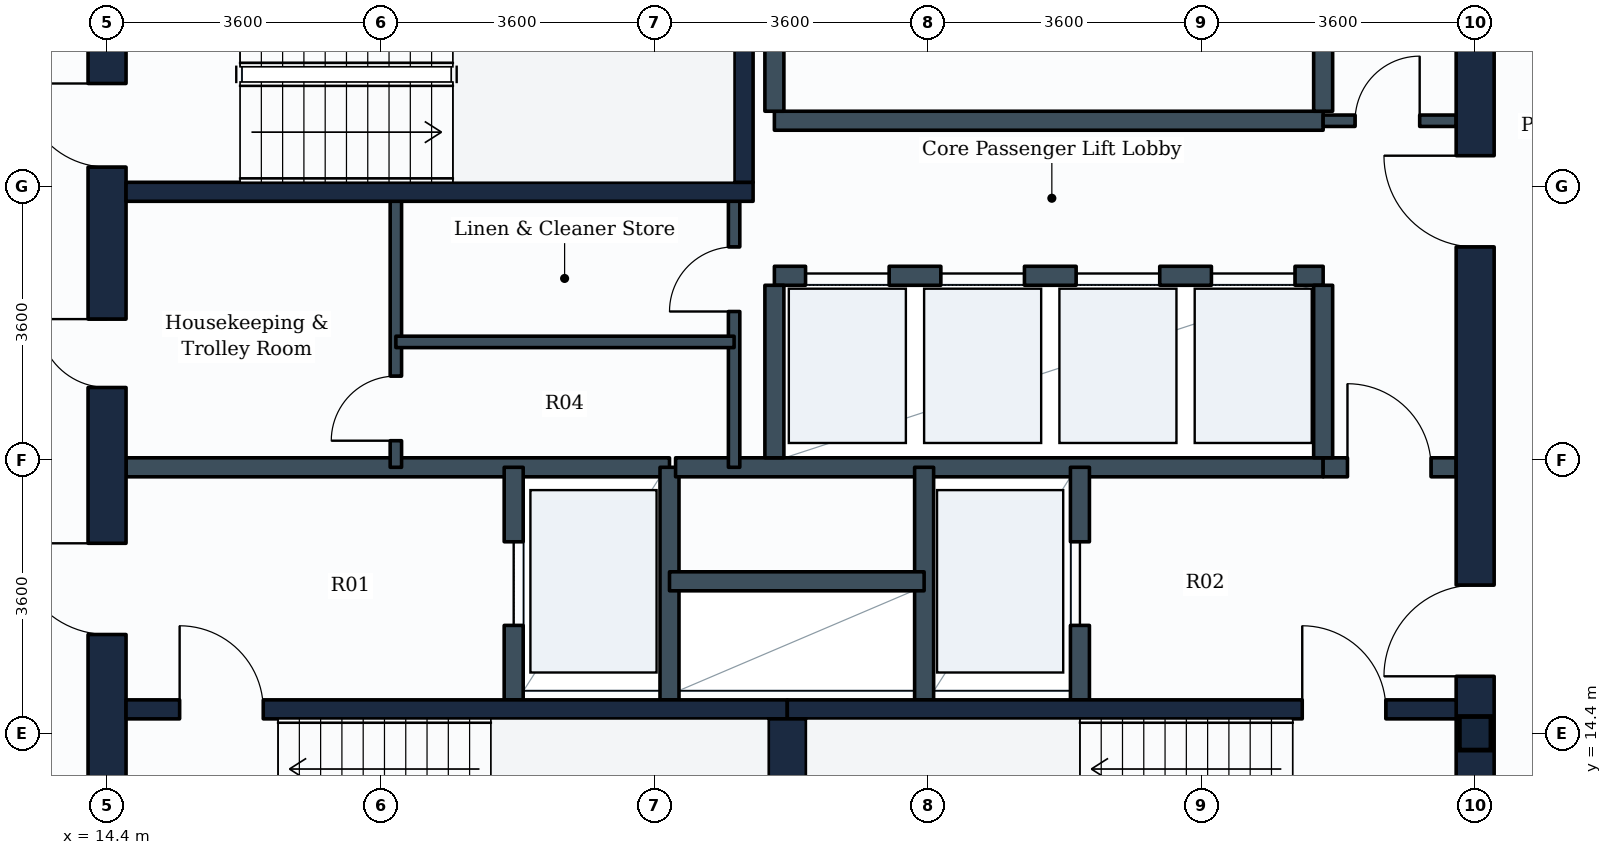
"""IFC4 building model, lengths in metres.
Left out: names, types, materials, properties, quantities, classifications, styles, units other than length and angle.
Written with IfcOpenShell. Run it as: python <this file> out.ifc"""

import sys

from ifc_helpers import new_model, si_unit, direction, frame, frame_2d, origin, origin_2d, place, context, subcontext, project, spatial, rectangle, i_section, extrude, element, fill, save


model = new_model("IFC4")
c1 = context("Model", 3, precision=1e-05, world=origin(), true_north=direction((0.0, 1.0)))
c2 = subcontext(c1, "Body", "Model", "MODEL_VIEW")
j1 = project(units=[si_unit("LENGTHUNIT", "METRE"), si_unit("PLANEANGLEUNIT", "RADIAN")], contexts=[c1])
p1 = place(None, origin())
s1 = spatial("IfcSite", under=j1, at=p1, CompositionType="ELEMENT")
p2 = place(p1, origin())
s2 = spatial("IfcBuilding", under=s1, at=p2, CompositionType="ELEMENT")
p3 = place(p2, frame((0.0, 0.0, 193.8)))
s3 = spatial("IfcBuildingStorey", under=s2, at=p3, CompositionType="ELEMENT", Elevation=193.8)
p4 = place(p3, frame((32.4, 14.4, 0.0), z_axis=(0.0, 0.0, 1.0), x_axis=(1.0, 0.0, 0.0)))
e1 = element("IfcColumn", 1, at=p4, inside=s3, PredefinedType="COLUMN", context=c2, shape_type="SweptSolid", body=[
    extrude(i_section(OverallWidth=0.416, OverallDepth=0.442, WebThickness=0.025, FlangeThickness=0.041, FilletRadius=0.015, at=origin_2d()), origin(), (0.0, 0.0, 1.0), 3.8),
])
p5 = place(p3, frame((14.4, 10.8, 0.0), z_axis=(0.0, 0.0, 1.0), x_axis=(0.0, 1.0, 0.0)))
e2 = element("IfcWall", 2, at=p5, inside=s3, PredefinedType="SHEAR", context=c2, shape_type="SweptSolid", body=[
    extrude(rectangle(XDim=14.4, YDim=0.5, at=frame_2d((7.2, 0.0))), origin(), (0.0, 0.0, 1.0), 3.55),
])
p6 = place(p5, frame((11.05, 0.0, 0.0)))
e3 = element("IfcOpeningElement", 3, at=p6, cuts=e2, PredefinedType="OPENING", context=c2, shape_type="SweptSolid", body=[
    extrude(rectangle(XDim=1.1, YDim=2.1, at=frame_2d((0.55, 1.05))), frame((0.0, 0.26, 0.0), z_axis=(0.0, -1.0, 0.0), x_axis=(1.0, 0.0, 0.0)), (0.0, 0.0, 1.0), 0.52),
])
p7 = place(p5, frame((4.9, 0.0, 0.0)))
e4 = element("IfcOpeningElement", 4, at=p7, cuts=e2, PredefinedType="OPENING", context=c2, shape_type="SweptSolid", body=[
    extrude(rectangle(XDim=1.2, YDim=2.1, at=frame_2d((0.6, 1.05))), frame((0.0, 0.26, 0.0), z_axis=(0.0, -1.0, 0.0), x_axis=(1.0, 0.0, 0.0)), (0.0, 0.0, 1.0), 0.52),
])
p8 = place(p5, frame((8.15, 0.0, 0.0)))
e5 = element("IfcOpeningElement", 5, at=p8, cuts=e2, PredefinedType="OPENING", context=c2, shape_type="SweptSolid", body=[
    extrude(rectangle(XDim=0.9, YDim=2.1, at=frame_2d((0.45, 1.05))), frame((0.0, 0.26, 0.0), z_axis=(0.0, -1.0, 0.0), x_axis=(1.0, 0.0, 0.0)), (0.0, 0.0, 1.0), 0.52),
])
p9 = place(p3, frame((32.4, 10.8, 0.0), z_axis=(0.0, 0.0, 1.0), x_axis=(0.0, 1.0, 0.0)))
e6 = element("IfcWall", 6, at=p9, inside=s3, PredefinedType="SHEAR", context=c2, shape_type="SweptSolid", body=[
    extrude(rectangle(XDim=14.4, YDim=0.5, at=frame_2d((7.2, 0.0))), origin(), (0.0, 0.0, 1.0), 3.55),
])
p10 = place(p9, frame((4.35, 0.0, 0.0)))
e7 = element("IfcOpeningElement", 7, at=p10, cuts=e6, PredefinedType="OPENING", context=c2, shape_type="SweptSolid", body=[
    extrude(rectangle(XDim=1.2, YDim=2.1, at=frame_2d((0.6, 1.05))), frame((0.0, 0.26, 0.0), z_axis=(0.0, -1.0, 0.0), x_axis=(1.0, 0.0, 0.0)), (0.0, 0.0, 1.0), 0.52),
])
p11 = place(p9, frame((10.0, 0.0, 0.0)))
e8 = element("IfcOpeningElement", 8, at=p11, cuts=e6, PredefinedType="OPENING", context=c2, shape_type="SweptSolid", body=[
    extrude(rectangle(XDim=1.2, YDim=2.1, at=frame_2d((0.6, 1.05))), frame((0.0, 0.26, 0.0), z_axis=(0.0, -1.0, 0.0), x_axis=(1.0, 0.0, 0.0)), (0.0, 0.0, 1.0), 0.52),
])
p12 = place(p3, frame((14.65, 14.715, 0.0), z_axis=(0.0, 0.0, 1.0), x_axis=(1.0, 0.0, 0.0)))
e9 = element("IfcWall", 9, at=p12, inside=s3, PredefinedType="SHEAR", context=c2, shape_type="SweptSolid", body=[
    extrude(rectangle(XDim=8.7, YDim=0.25, at=frame_2d((4.35, 0.0))), origin(), (0.0, 0.0, 1.0), 3.55),
])
p13 = place(p12, frame((0.705, 0.0, 0.0)))
e10 = element("IfcOpeningElement", 10, at=p13, cuts=e9, PredefinedType="OPENING", context=c2, shape_type="SweptSolid", body=[
    extrude(rectangle(XDim=1.1, YDim=2.1, at=frame_2d((0.55, 1.05))), frame((0.0, 0.135, 0.0), z_axis=(0.0, -1.0, 0.0), x_axis=(1.0, 0.0, 0.0)), (0.0, 0.0, 1.0), 0.27),
])
p14 = place(p3, frame((23.35, 14.715, 0.0), z_axis=(0.0, 0.0, 1.0), x_axis=(1.0, 0.0, 0.0)))
e11 = element("IfcWall", 11, at=p14, inside=s3, PredefinedType="SHEAR", context=c2, shape_type="SweptSolid", body=[
    extrude(rectangle(XDim=8.8, YDim=0.25, at=frame_2d((4.4, 0.0))), origin(), (0.0, 0.0, 1.0), 3.55),
])
p15 = place(p14, frame((6.775, 0.0, 0.0)))
e12 = element("IfcOpeningElement", 12, at=p15, cuts=e11, PredefinedType="OPENING", context=c2, shape_type="SweptSolid", body=[
    extrude(rectangle(XDim=1.1, YDim=2.1, at=frame_2d((0.55, 1.05))), frame((0.0, 0.135, 0.0), z_axis=(0.0, -1.0, 0.0), x_axis=(1.0, 0.0, 0.0)), (0.0, 0.0, 1.0), 0.27),
])
p16 = place(p3, frame((23.35, 11.75, 0.0), z_axis=(0.0, 0.0, 1.0), x_axis=(0.0, 1.0, 0.0)))
e13 = element("IfcWall", 13, at=p16, inside=s3, PredefinedType="SHEAR", context=c2, shape_type="SweptSolid", body=[
    extrude(rectangle(XDim=2.84, YDim=0.5, at=frame_2d((1.42, 0.0))), origin(), (0.0, 0.0, 1.0), 3.55),
])
p17 = place(p3, frame((14.65, 21.525, 0.0), z_axis=(0.0, 0.0, 1.0), x_axis=(1.0, 0.0, 0.0)))
e14 = element("IfcWall", 14, at=p17, inside=s3, PredefinedType="SHEAR", context=c2, shape_type="SweptSolid", body=[
    extrude(rectangle(XDim=8.25, YDim=0.25, at=frame_2d((4.125, 0.0))), origin(), (0.0, 0.0, 1.0), 3.55),
])
p18 = place(p3, frame((22.775, 21.65, 0.0), z_axis=(0.0, 0.0, 1.0), x_axis=(0.0, 1.0, 0.0)))
e15 = element("IfcWall", 15, at=p18, inside=s3, PredefinedType="SHEAR", context=c2, shape_type="SweptSolid", body=[
    extrude(rectangle(XDim=2.84, YDim=0.25, at=frame_2d((1.42, 0.0))), origin(), (0.0, 0.0, 1.0), 3.55),
])
p19 = place(p3, frame((14.65, 17.9, 0.0), z_axis=(0.0, 0.0, 1.0), x_axis=(1.0, 0.0, 0.0)))
e16 = element("IfcWall", 16, at=p19, inside=s3, PredefinedType="PARTITIONING", context=c2, shape_type="SweptSolid", body=[
    extrude(rectangle(XDim=7.15, YDim=0.25, at=frame_2d((3.575, 0.0))), origin(), (0.0, 0.0, 1.0), 3.535),
])
p20 = place(p3, frame((19.75, 14.84, 0.0), z_axis=(0.0, 0.0, 1.0), x_axis=(0.0, 1.0, 0.0)))
e17 = element("IfcWall", 17, at=p20, inside=s3, PredefinedType="PARTITIONING", context=c2, shape_type="SweptSolid", body=[
    extrude(rectangle(XDim=3.06, YDim=0.25, at=frame_2d((1.53, 0.0))), origin(), (0.0, 0.0, 1.0), 3.535),
])
p21 = place(p20, frame((0.98, 0.0, 0.0)))
e18 = element("IfcOpeningElement", 18, at=p21, cuts=e17, PredefinedType="OPENING", context=c2, shape_type="SweptSolid", body=[
    extrude(rectangle(XDim=1.1, YDim=2.1, at=frame_2d((0.55, 1.05))), frame((0.0, 0.135, 0.0), z_axis=(0.0, -1.0, 0.0), x_axis=(1.0, 0.0, 0.0)), (0.0, 0.0, 1.0), 0.27),
])
p22 = place(p3, frame((21.8, 14.84, 0.0), z_axis=(0.0, 0.0, 1.0), x_axis=(0.0, 1.0, 0.0)))
e19 = element("IfcWall", 19, at=p22, inside=s3, PredefinedType="PARTITIONING", context=c2, shape_type="SweptSolid", body=[
    extrude(rectangle(XDim=3.06, YDim=0.25, at=frame_2d((1.53, 0.0))), origin(), (0.0, 0.0, 1.0), 3.535),
])
p23 = place(p3, frame((21.88, 17.9, 0.0), z_axis=(0.0, 0.0, 1.0), x_axis=(1.0, 0.0, 0.0)))
e20 = element("IfcWall", 20, at=p23, inside=s3, PredefinedType="PARTITIONING", context=c2, shape_type="SweptSolid", body=[
    extrude(rectangle(XDim=8.52, YDim=0.25, at=frame_2d((4.26, 0.0))), origin(), (0.0, 0.0, 1.0), 3.535),
])
p24 = place(p3, frame((30.4, 17.9, 0.0), z_axis=(0.0, 0.0, 1.0), x_axis=(1.0, 0.0, 0.0)))
e21 = element("IfcWall", 21, at=p24, inside=s3, PredefinedType="PARTITIONING", context=c2, shape_type="SweptSolid", body=[
    extrude(rectangle(XDim=1.75, YDim=0.25, at=frame_2d((0.875, 0.0))), origin(), (0.0, 0.0, 1.0), 3.535),
])
p25 = place(p24, frame((0.32, 0.0, 0.0)))
e22 = element("IfcOpeningElement", 22, at=p25, cuts=e21, PredefinedType="OPENING", context=c2, shape_type="SweptSolid", body=[
    extrude(rectangle(XDim=1.1, YDim=2.1, at=frame_2d((0.55, 1.05))), frame((0.0, 0.135, 0.0), z_axis=(0.0, -1.0, 0.0), x_axis=(1.0, 0.0, 0.0)), (0.0, 0.0, 1.0), 0.27),
])
p26 = place(p3, frame((25.15, 14.84, 0.0), z_axis=(0.0, 0.0, 1.0), x_axis=(0.0, 1.0, 0.0)))
e23 = element("IfcWall", 23, at=p26, inside=s3, PredefinedType="PARTITIONING", context=c2, shape_type="SweptSolid", body=[
    extrude(rectangle(XDim=3.06, YDim=0.25, at=frame_2d((1.53, 0.0))), origin(), (0.0, 0.0, 1.0), 3.535),
])
p27 = place(p3, frame((27.2, 14.84, 0.0), z_axis=(0.0, 0.0, 1.0), x_axis=(0.0, 1.0, 0.0)))
e24 = element("IfcWall", 24, at=p27, inside=s3, PredefinedType="PARTITIONING", context=c2, shape_type="SweptSolid", body=[
    extrude(rectangle(XDim=3.06, YDim=0.25, at=frame_2d((1.53, 0.0))), origin(), (0.0, 0.0, 1.0), 3.535),
])
p28 = place(p27, frame((0.98, 0.0, 0.0)))
e25 = element("IfcOpeningElement", 25, at=p28, cuts=e24, PredefinedType="OPENING", context=c2, shape_type="SweptSolid", body=[
    extrude(rectangle(XDim=1.1, YDim=2.1, at=frame_2d((0.55, 1.05))), frame((0.0, 0.135, 0.0), z_axis=(0.0, -1.0, 0.0), x_axis=(1.0, 0.0, 0.0)), (0.0, 0.0, 1.0), 0.27),
])
p29 = place(p3, frame((21.8, 16.4, 0.0), z_axis=(0.0, 0.0, 1.0), x_axis=(1.0, 0.0, 0.0)))
e26 = element("IfcWall", 26, at=p29, inside=s3, PredefinedType="PARTITIONING", context=c2, shape_type="SweptSolid", body=[
    extrude(rectangle(XDim=3.35, YDim=0.25, at=frame_2d((1.675, 0.0))), origin(), (0.0, 0.0, 1.0), 3.535),
])
p30 = place(p3, frame((23.18, 20.42, 0.0), z_axis=(0.0, 0.0, 1.0), x_axis=(1.0, 0.0, 0.0)))
e27 = element("IfcWall", 27, at=p30, inside=s3, PredefinedType="PARTITIONING", context=c2, shape_type="SweptSolid", body=[
    extrude(rectangle(XDim=7.22, YDim=0.25, at=frame_2d((3.61, 0.0))), origin(), (0.0, 0.0, 1.0), 3.535),
])
p31 = place(p30, frame((0.41, 0.0, 0.0)))
e28 = element("IfcOpeningElement", 28, at=p31, cuts=e27, PredefinedType="OPENING", context=c2, shape_type="SweptSolid", body=[
    extrude(rectangle(XDim=1.1, YDim=2.1, at=frame_2d((0.55, 1.05))), frame((0.0, 0.135, 0.0), z_axis=(0.0, -1.0, 0.0), x_axis=(1.0, 0.0, 0.0)), (0.0, 0.0, 1.0), 0.27),
])
p32 = place(p30, frame((2.19, 0.0, 0.0)))
e29 = element("IfcOpeningElement", 29, at=p32, cuts=e27, PredefinedType="OPENING", context=c2, shape_type="SweptSolid", body=[
    extrude(rectangle(XDim=1.1, YDim=2.1, at=frame_2d((0.55, 1.05))), frame((0.0, 0.135, 0.0), z_axis=(0.0, -1.0, 0.0), x_axis=(1.0, 0.0, 0.0)), (0.0, 0.0, 1.0), 0.27),
])
p33 = place(p30, frame((3.97, 0.0, 0.0)))
e30 = element("IfcOpeningElement", 30, at=p33, cuts=e27, PredefinedType="OPENING", context=c2, shape_type="SweptSolid", body=[
    extrude(rectangle(XDim=1.1, YDim=2.1, at=frame_2d((0.55, 1.05))), frame((0.0, 0.135, 0.0), z_axis=(0.0, -1.0, 0.0), x_axis=(1.0, 0.0, 0.0)), (0.0, 0.0, 1.0), 0.27),
])
p34 = place(p30, frame((5.75, 0.0, 0.0)))
e31 = element("IfcOpeningElement", 31, at=p34, cuts=e27, PredefinedType="OPENING", context=c2, shape_type="SweptSolid", body=[
    extrude(rectangle(XDim=1.1, YDim=2.1, at=frame_2d((0.55, 1.05))), frame((0.0, 0.135, 0.0), z_axis=(0.0, -1.0, 0.0), x_axis=(1.0, 0.0, 0.0)), (0.0, 0.0, 1.0), 0.27),
])
for number, where, z_axis, x_axis in (
    (32, (23.18, 18.025, 0.0), (0.0, 0.0, 1.0), (0.0, 1.0, 0.0)),
    (33, (30.4, 18.025, 0.0), (0.0, 0.0, 1.0), (0.0, 1.0, 0.0)),
):
    element("IfcWall", number, at=place(p3, frame(where, z_axis=z_axis, x_axis=x_axis)), inside=s3, PredefinedType="PARTITIONING", context=c2, shape_type="SweptSolid", body=[
        extrude(rectangle(XDim=2.27, YDim=0.25, at=frame_2d((1.135, 0.0))), origin(), (0.0, 0.0, 1.0), 3.535),
    ])
p35 = place(p3, frame((23.18, 22.46, 0.0), z_axis=(0.0, 0.0, 1.0), x_axis=(1.0, 0.0, 0.0)))
e34 = element("IfcWall", 34, at=p35, inside=s3, PredefinedType="PARTITIONING", context=c2, shape_type="SweptSolid", body=[
    extrude(rectangle(XDim=7.22, YDim=0.25, at=frame_2d((3.61, 0.0))), origin(), (0.0, 0.0, 1.0), 3.535),
])
for number, where, z_axis, x_axis in (
    (35, (23.18, 22.585, 0.0), (0.0, 0.0, 1.0), (0.0, 1.0, 0.0)),
    (36, (30.4, 22.585, 0.0), (0.0, 0.0, 1.0), (0.0, 1.0, 0.0)),
):
    element("IfcWall", number, at=place(p3, frame(where, z_axis=z_axis, x_axis=x_axis)), inside=s3, PredefinedType="PARTITIONING", context=c2, shape_type="SweptSolid", body=[
        extrude(rectangle(XDim=2.315, YDim=0.25, at=frame_2d((1.157, 0.0))), origin(), (0.0, 0.0, 1.0), 3.535),
    ])
p36 = place(p3, frame((22.65, 17.9, 0.0), z_axis=(0.0, 0.0, 1.0), x_axis=(0.0, 1.0, 0.0)))
e37 = element("IfcWall", 37, at=p36, inside=s3, PredefinedType="PARTITIONING", context=c2, shape_type="SweptSolid", body=[
    extrude(rectangle(XDim=3.625, YDim=0.15, at=frame_2d((1.812, 0.0))), origin(), (0.0, 0.0, 1.0), 3.535),
])
p37 = place(p36, frame((2.05, 0.0, 0.0)))
e38 = element("IfcOpeningElement", 38, at=p37, cuts=e37, PredefinedType="OPENING", context=c2, shape_type="SweptSolid", body=[
    extrude(rectangle(XDim=0.85, YDim=2.1, at=frame_2d((0.425, 1.05))), frame((0.0, 0.085, 0.0), z_axis=(0.0, -1.0, 0.0), x_axis=(1.0, 0.0, 0.0)), (0.0, 0.0, 1.0), 0.17),
])
p38 = place(p3, frame((18.2, 17.9, 0.0), z_axis=(0.0, 0.0, 1.0), x_axis=(0.0, 1.0, 0.0)))
e39 = element("IfcWall", 39, at=p38, inside=s3, PredefinedType="PARTITIONING", context=c2, shape_type="SweptSolid", body=[
    extrude(rectangle(XDim=3.625, YDim=0.15, at=frame_2d((1.812, 0.0))), origin(), (0.0, 0.0, 1.0), 3.535),
])
p39 = place(p38, frame((0.35, 0.0, 0.0)))
e40 = element("IfcOpeningElement", 40, at=p39, cuts=e39, PredefinedType="OPENING", context=c2, shape_type="SweptSolid", body=[
    extrude(rectangle(XDim=0.85, YDim=2.1, at=frame_2d((0.425, 1.05))), frame((0.0, 0.085, 0.0), z_axis=(0.0, -1.0, 0.0), x_axis=(1.0, 0.0, 0.0)), (0.0, 0.0, 1.0), 0.17),
])
p40 = place(p3, frame((18.2, 19.55, 0.0), z_axis=(0.0, 0.0, 1.0), x_axis=(1.0, 0.0, 0.0)))
e41 = element("IfcWall", 41, at=p40, inside=s3, PredefinedType="PARTITIONING", context=c2, shape_type="SweptSolid", body=[
    extrude(rectangle(XDim=4.45, YDim=0.15, at=frame_2d((2.225, 0.0))), origin(), (0.0, 0.0, 1.0), 3.535),
])
p41 = place(p3, frame((30.4, 22.46, 0.0), z_axis=(0.0, 0.0, 1.0), x_axis=(1.0, 0.0, 0.0)))
e42 = element("IfcWall", 42, at=p41, inside=s3, PredefinedType="PARTITIONING", context=c2, shape_type="SweptSolid", body=[
    extrude(rectangle(XDim=1.75, YDim=0.15, at=frame_2d((0.875, 0.0))), origin(), (0.0, 0.0, 1.0), 3.535),
])
p42 = place(p41, frame((0.42, 0.0, 0.0)))
e43 = element("IfcOpeningElement", 43, at=p42, cuts=e42, PredefinedType="OPENING", context=c2, shape_type="SweptSolid", body=[
    extrude(rectangle(XDim=0.85, YDim=2.1, at=frame_2d((0.425, 1.05))), frame((0.0, 0.085, 0.0), z_axis=(0.0, -1.0, 0.0), x_axis=(1.0, 0.0, 0.0)), (0.0, 0.0, 1.0), 0.17),
])
p43 = place(p13, origin())
e44 = element("IfcDoor", 44, at=p43, inside=s3, OperationType="SINGLE_SWING_LEFT", PredefinedType="DOOR", context=c2, shape_type="SweptSolid", body=[
    extrude(rectangle(XDim=1.1, YDim=2.1, at=frame_2d((0.55, 1.05))), frame((0.0, 0.025, 0.0), z_axis=(0.0, -1.0, 0.0), x_axis=(1.0, 0.0, 0.0)), (0.0, 0.0, 1.0), 0.05),
])
fill(e10, e44)
p44 = place(p15, origin())
e45 = element("IfcDoor", 45, at=p44, inside=s3, OperationType="SINGLE_SWING_LEFT", PredefinedType="DOOR", context=c2, shape_type="SweptSolid", body=[
    extrude(rectangle(XDim=1.1, YDim=2.1, at=frame_2d((0.55, 1.05))), frame((0.0, 0.025, 0.0), z_axis=(0.0, -1.0, 0.0), x_axis=(1.0, 0.0, 0.0)), (0.0, 0.0, 1.0), 0.05),
])
fill(e12, e45)
p45 = place(p6, origin())
e46 = element("IfcDoor", 46, at=p45, inside=s3, OperationType="SINGLE_SWING_RIGHT", PredefinedType="DOOR", context=c2, shape_type="SweptSolid", body=[
    extrude(rectangle(XDim=1.1, YDim=2.1, at=frame_2d((0.55, 1.05))), frame((0.0, 0.025, 0.0), z_axis=(0.0, -1.0, 0.0), x_axis=(1.0, 0.0, 0.0)), (0.0, 0.0, 1.0), 0.05),
])
fill(e3, e46)
p46 = place(p21, origin())
e47 = element("IfcDoor", 47, at=p46, inside=s3, OperationType="SLIDING_TO_LEFT", PredefinedType="DOOR", context=c2, shape_type="SweptSolid", body=[
    extrude(rectangle(XDim=1.1, YDim=2.1, at=frame_2d((0.55, 1.05))), frame((0.0, 0.025, 0.0), z_axis=(0.0, -1.0, 0.0), x_axis=(1.0, 0.0, 0.0)), (0.0, 0.0, 1.0), 0.05),
])
fill(e18, e47)
p47 = place(p28, origin())
e48 = element("IfcDoor", 48, at=p47, inside=s3, OperationType="SLIDING_TO_LEFT", PredefinedType="DOOR", context=c2, shape_type="SweptSolid", body=[
    extrude(rectangle(XDim=1.1, YDim=2.1, at=frame_2d((0.55, 1.05))), frame((0.0, 0.025, 0.0), z_axis=(0.0, -1.0, 0.0), x_axis=(1.0, 0.0, 0.0)), (0.0, 0.0, 1.0), 0.05),
])
fill(e25, e48)
p48 = place(p7, origin())
e49 = element("IfcDoor", 49, at=p48, inside=s3, OperationType="SINGLE_SWING_RIGHT", PredefinedType="DOOR", context=c2, shape_type="SweptSolid", body=[
    extrude(rectangle(XDim=1.2, YDim=2.1, at=frame_2d((0.6, 1.05))), frame((0.0, 0.025, 0.0), z_axis=(0.0, -1.0, 0.0), x_axis=(1.0, 0.0, 0.0)), (0.0, 0.0, 1.0), 0.05),
])
fill(e4, e49)
p49 = place(p10, origin())
e50 = element("IfcDoor", 50, at=p49, inside=s3, OperationType="SINGLE_SWING_LEFT", PredefinedType="DOOR", context=c2, shape_type="SweptSolid", body=[
    extrude(rectangle(XDim=1.2, YDim=2.1, at=frame_2d((0.6, 1.05))), frame((0.0, 0.025, 0.0), z_axis=(0.0, -1.0, 0.0), x_axis=(1.0, 0.0, 0.0)), (0.0, 0.0, 1.0), 0.05),
])
fill(e7, e50)
p50 = place(p25, origin())
e51 = element("IfcDoor", 51, at=p50, inside=s3, OperationType="SINGLE_SWING_LEFT", PredefinedType="DOOR", context=c2, shape_type="SweptSolid", body=[
    extrude(rectangle(XDim=1.1, YDim=2.1, at=frame_2d((0.55, 1.05))), frame((0.0, 0.025, 0.0), z_axis=(0.0, -1.0, 0.0), x_axis=(1.0, 0.0, 0.0)), (0.0, 0.0, 1.0), 0.05),
])
fill(e22, e51)
p51 = place(p31, origin())
e52 = element("IfcDoor", 52, at=p51, inside=s3, OperationType="SLIDING_TO_LEFT", PredefinedType="DOOR", context=c2, shape_type="SweptSolid", body=[
    extrude(rectangle(XDim=1.1, YDim=2.1, at=frame_2d((0.55, 1.05))), frame((0.0, 0.025, 0.0), z_axis=(0.0, -1.0, 0.0), x_axis=(1.0, 0.0, 0.0)), (0.0, 0.0, 1.0), 0.05),
])
fill(e28, e52)
p52 = place(p32, origin())
e53 = element("IfcDoor", 53, at=p52, inside=s3, OperationType="SLIDING_TO_LEFT", PredefinedType="DOOR", context=c2, shape_type="SweptSolid", body=[
    extrude(rectangle(XDim=1.1, YDim=2.1, at=frame_2d((0.55, 1.05))), frame((0.0, 0.025, 0.0), z_axis=(0.0, -1.0, 0.0), x_axis=(1.0, 0.0, 0.0)), (0.0, 0.0, 1.0), 0.05),
])
fill(e29, e53)
p53 = place(p33, origin())
e54 = element("IfcDoor", 54, at=p53, inside=s3, OperationType="SLIDING_TO_LEFT", PredefinedType="DOOR", context=c2, shape_type="SweptSolid", body=[
    extrude(rectangle(XDim=1.1, YDim=2.1, at=frame_2d((0.55, 1.05))), frame((0.0, 0.025, 0.0), z_axis=(0.0, -1.0, 0.0), x_axis=(1.0, 0.0, 0.0)), (0.0, 0.0, 1.0), 0.05),
])
fill(e30, e54)
p54 = place(p34, origin())
e55 = element("IfcDoor", 55, at=p54, inside=s3, OperationType="SLIDING_TO_LEFT", PredefinedType="DOOR", context=c2, shape_type="SweptSolid", body=[
    extrude(rectangle(XDim=1.1, YDim=2.1, at=frame_2d((0.55, 1.05))), frame((0.0, 0.025, 0.0), z_axis=(0.0, -1.0, 0.0), x_axis=(1.0, 0.0, 0.0)), (0.0, 0.0, 1.0), 0.05),
])
fill(e31, e55)
p55 = place(p11, origin())
e56 = element("IfcDoor", 56, at=p55, inside=s3, OperationType="SINGLE_SWING_RIGHT", PredefinedType="DOOR", context=c2, shape_type="SweptSolid", body=[
    extrude(rectangle(XDim=1.2, YDim=2.1, at=frame_2d((0.6, 1.05))), frame((0.0, 0.025, 0.0), z_axis=(0.0, -1.0, 0.0), x_axis=(1.0, 0.0, 0.0)), (0.0, 0.0, 1.0), 0.05),
])
fill(e8, e56)
p56 = place(p8, origin())
e57 = element("IfcDoor", 57, at=p56, inside=s3, OperationType="SINGLE_SWING_RIGHT", PredefinedType="DOOR", context=c2, shape_type="SweptSolid", body=[
    extrude(rectangle(XDim=0.9, YDim=2.1, at=frame_2d((0.45, 1.05))), frame((0.0, 0.025, 0.0), z_axis=(0.0, -1.0, 0.0), x_axis=(1.0, 0.0, 0.0)), (0.0, 0.0, 1.0), 0.05),
])
fill(e5, e57)
p57 = place(p39, origin())
e58 = element("IfcDoor", 58, at=p57, inside=s3, OperationType="SINGLE_SWING_LEFT", PredefinedType="DOOR", context=c2, shape_type="SweptSolid", body=[
    extrude(rectangle(XDim=0.85, YDim=2.1, at=frame_2d((0.425, 1.05))), frame((0.0, 0.025, 0.0), z_axis=(0.0, -1.0, 0.0), x_axis=(1.0, 0.0, 0.0)), (0.0, 0.0, 1.0), 0.05),
])
fill(e40, e58)
p58 = place(p37, origin())
e59 = element("IfcDoor", 59, at=p58, inside=s3, OperationType="SINGLE_SWING_LEFT", PredefinedType="DOOR", context=c2, shape_type="SweptSolid", body=[
    extrude(rectangle(XDim=0.85, YDim=2.1, at=frame_2d((0.425, 1.05))), frame((0.0, 0.025, 0.0), z_axis=(0.0, -1.0, 0.0), x_axis=(1.0, 0.0, 0.0)), (0.0, 0.0, 1.0), 0.05),
])
fill(e38, e59)
p59 = place(p42, origin())
e60 = element("IfcDoor", 60, at=p59, inside=s3, OperationType="SINGLE_SWING_RIGHT", PredefinedType="DOOR", context=c2, shape_type="SweptSolid", body=[
    extrude(rectangle(XDim=0.85, YDim=2.1, at=frame_2d((0.425, 1.05))), frame((0.0, 0.025, 0.0), z_axis=(0.0, -1.0, 0.0), x_axis=(1.0, 0.0, 0.0)), (0.0, 0.0, 1.0), 0.05),
])
fill(e43, e60)
save(model, sys.argv[1])
